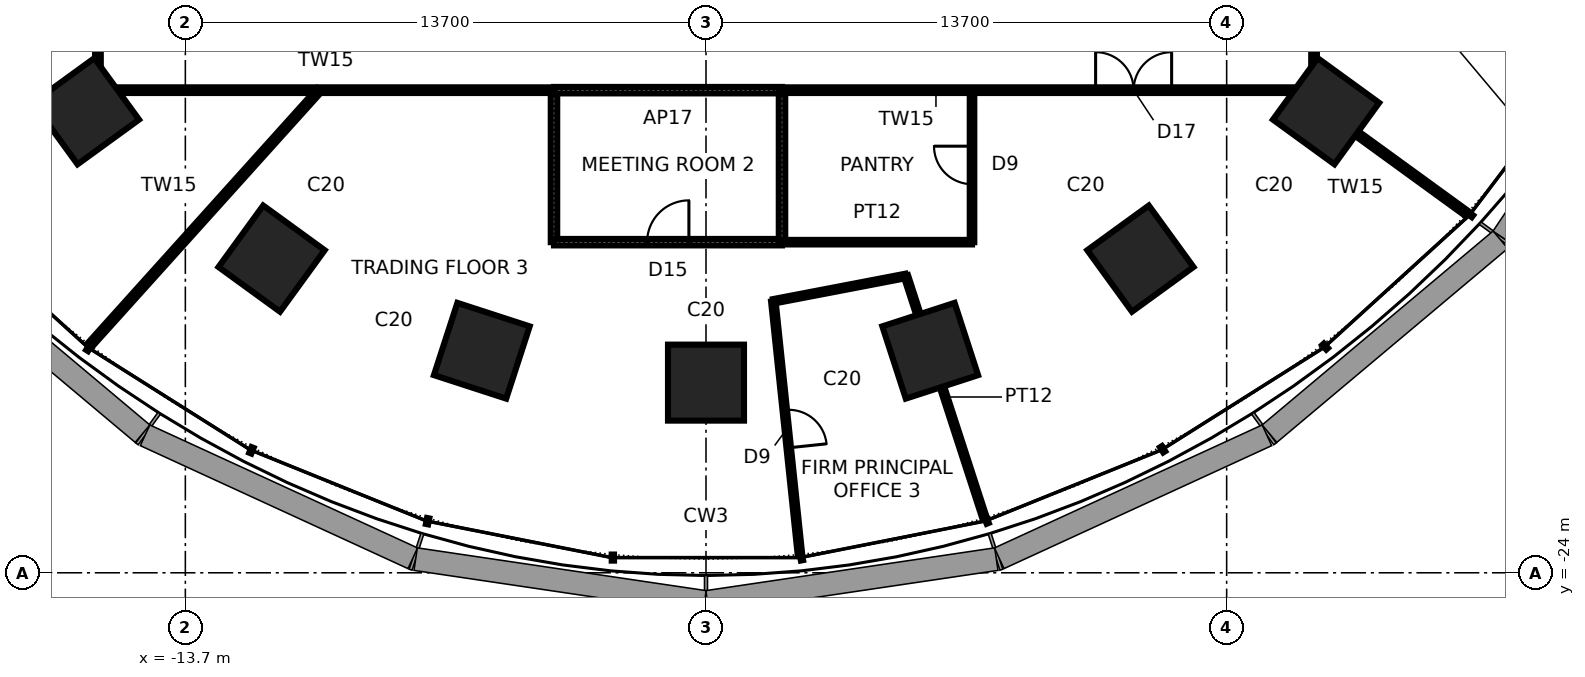
"""IFC4 building model, lengths in metres.
Left out: names, types, materials, properties, quantities, classifications, styles, units other than length and angle.
Written with IfcOpenShell. Run it as: python <this file> out.ifc"""

import sys

from ifc_helpers import new_model, si_unit, direction, frame, frame_2d, origin, origin_2d, place, context, subcontext, project, spatial, rectangle, extrude, element, fill, save


model = new_model("IFC4")
c1 = context("Model", 3, precision=1e-05, world=origin(), true_north=direction((0.0, 1.0)))
c2 = subcontext(c1, "Body", "Model", "MODEL_VIEW")
j1 = project(units=[si_unit("LENGTHUNIT", "METRE"), si_unit("PLANEANGLEUNIT", "RADIAN")], contexts=[c1])
p1 = place(None, origin())
s1 = spatial("IfcSite", under=j1, at=p1, CompositionType="ELEMENT")
p2 = place(p1, origin())
s2 = spatial("IfcBuilding", under=s1, at=p2, CompositionType="ELEMENT")
p3 = place(p2, frame((0.0, 0.0, 65.8)))
s3 = spatial("IfcBuildingStorey", under=s2, at=p3, CompositionType="ELEMENT", Elevation=65.8)
for number, where, z_axis, x_axis in (
    (1, (-16.315, -11.854, 0.0), (0.0, 0.0, 1.0), (-0.809, -0.588, 0.0)),
    (2, (-11.43, -15.733, 0.0), (0.0, 0.0, 1.0), (-0.588, -0.809, 0.0)),
    (3, (-5.9, -18.157, 0.0), (0.0, 0.0, 1.0), (-0.309, -0.951, 0.0)),
    (4, (0.0, -18.996, 0.0), (0.0, 0.0, 1.0), (0.0, -1.0, 0.0)),
    (5, (5.9, -18.157, 0.0), (0.0, 0.0, 1.0), (0.309, -0.951, 0.0)),
    (6, (11.43, -15.733, 0.0), (0.0, 0.0, 1.0), (0.588, -0.809, 0.0)),
    (7, (16.315, -11.854, 0.0), (0.0, 0.0, 1.0), (0.809, -0.588, 0.0)),
):
    element("IfcColumn", number, at=place(p3, frame(where, z_axis=z_axis, x_axis=x_axis)), inside=s3, PredefinedType="COLUMN", context=c2, shape_type="SweptSolid", body=[
        extrude(rectangle(XDim=2.0, YDim=2.0, at=origin_2d()), origin(), (0.0, 0.0, 1.0), 4.2),
    ])
p4 = place(p3, frame((-23.208, -10.333, 0.0), z_axis=(0.0, 0.0, 1.0), x_axis=(0.91354990356, 0.406726657235, 0.0)))
e8 = element("IfcWall", 8, at=p4, inside=s3, PredefinedType="PARTITIONING", context=c2, shape_type="SweptSolid", body=[
    extrude(rectangle(XDim=6.7, YDim=0.12, at=frame_2d((3.35, 0.0))), origin(), (0.0, 0.0, 1.0), 4.04),
])
p5 = place(p3, frame((-16.0, -3.5, 0.0), z_axis=(0.0, 0.0, 1.0), x_axis=(0.0, -1.0, 0.0)))
e9 = element("IfcWall", 9, at=p5, inside=s3, PredefinedType="PARTITIONING", context=c2, shape_type="SweptSolid", body=[
    extrude(rectangle(XDim=7.8, YDim=0.15, at=frame_2d((3.9, 0.0))), origin(), (0.0, 0.0, 1.0), 4.04),
])
p6 = place(p3, frame((-10.175, -11.3, 0.0), z_axis=(0.0, 0.0, 1.0), x_axis=(-0.669136564673, -0.743139460544, 0.0)))
e10 = element("IfcWall", 10, at=p6, inside=s3, PredefinedType="PARTITIONING", context=c2, shape_type="SweptSolid", body=[
    extrude(rectangle(XDim=9.026, YDim=0.15, at=frame_2d((4.513, 0.0))), origin(), (0.0, 0.0, 1.0), 4.04),
])
p7 = place(p3, frame((-16.0, -11.3, 0.0), z_axis=(0.0, 0.0, 1.0), x_axis=(1.0, 0.0, 0.0)))
e11 = element("IfcWall", 11, at=p7, inside=s3, PredefinedType="PARTITIONING", context=c2, shape_type="SweptSolid", body=[
    extrude(rectangle(XDim=12.0, YDim=0.15, at=frame_2d((6.0, 0.0))), origin(), (0.0, 0.0, 1.0), 4.04),
])
p8 = place(p3, frame((-4.0, -11.3, 0.0), z_axis=(0.0, 0.0, 1.0), x_axis=(0.0, -1.0, 0.0)))
e12 = element("IfcWall", 12, at=p8, inside=s3, PredefinedType="PARTITIONING", context=c2, shape_type="SweptSolid", body=[
    extrude(rectangle(XDim=4.0, YDim=0.17, at=frame_2d((2.0, 0.0))), origin(), (0.0, 0.0, 1.0), 4.04),
])
p9 = place(p3, frame((2.0, -11.3, 0.0), z_axis=(0.0, 0.0, 1.0), x_axis=(-1.0, 0.0, 0.0)))
e13 = element("IfcWall", 13, at=p9, inside=s3, PredefinedType="PARTITIONING", context=c2, shape_type="SweptSolid", body=[
    extrude(rectangle(XDim=6.0, YDim=0.17, at=frame_2d((3.0, 0.0))), origin(), (0.0, 0.0, 1.0), 4.04),
])
p10 = place(p3, frame((-4.0, -15.3, 0.0), z_axis=(0.0, 0.0, 1.0), x_axis=(1.0, 0.0, 0.0)))
e14 = element("IfcWall", 14, at=p10, inside=s3, PredefinedType="PARTITIONING", context=c2, shape_type="SweptSolid", body=[
    extrude(rectangle(XDim=6.0, YDim=0.17, at=frame_2d((3.0, 0.0))), origin(), (0.0, 0.0, 1.0), 3.586),
])
p11 = place(p10, frame((2.45, 0.0, 0.0)))
e15 = element("IfcOpeningElement", 15, at=p11, cuts=e14, PredefinedType="OPENING", context=c2, shape_type="SweptSolid", body=[
    extrude(rectangle(XDim=1.1, YDim=2.4, at=frame_2d((0.55, 1.2))), frame((0.0, 0.095, 0.0), z_axis=(0.0, -1.0, 0.0), x_axis=(1.0, 0.0, 0.0)), (0.0, 0.0, 1.0), 0.19),
])
p12 = place(p3, frame((1.772, -16.857, 0.0), z_axis=(0.0, 0.0, 1.0), x_axis=(0.104542522915, -0.994520417539, 0.0)))
e16 = element("IfcWall", 16, at=p12, inside=s3, PredefinedType="PARTITIONING", context=c2, shape_type="SweptSolid", body=[
    extrude(rectangle(XDim=6.7, YDim=0.12, at=frame_2d((3.35, 0.0))), origin(), (0.0, 0.0, 1.0), 4.04),
])
p13 = place(p12, frame((2.875, 0.0, 0.0)))
e17 = element("IfcOpeningElement", 17, at=p13, cuts=e16, PredefinedType="OPENING", context=c2, shape_type="SweptSolid", body=[
    extrude(rectangle(XDim=1.0, YDim=2.4, at=frame_2d((0.5, 1.2))), frame((0.0, 0.07, 0.0), z_axis=(0.0, -1.0, 0.0), x_axis=(1.0, 0.0, 0.0)), (0.0, 0.0, 1.0), 0.14),
])
p14 = place(p3, frame((2.0, -11.3, 0.0), z_axis=(0.0, 0.0, 1.0), x_axis=(0.0, -1.0, 0.0)))
e18 = element("IfcWall", 18, at=p14, inside=s3, PredefinedType="PARTITIONING", context=c2, shape_type="SweptSolid", body=[
    extrude(rectangle(XDim=4.0, YDim=0.17, at=frame_2d((2.0, 0.0))), origin(), (0.0, 0.0, 1.0), 4.04),
])
p15 = place(p3, frame((5.26, -16.188, 0.0), z_axis=(0.0, 0.0, 1.0), x_axis=(-0.982089213151, -0.188416499842, 0.0)))
e19 = element("IfcWall", 19, at=p15, inside=s3, PredefinedType="PARTITIONING", context=c2, shape_type="SweptSolid", body=[
    extrude(rectangle(XDim=3.552, YDim=0.12, at=frame_2d((1.776, 0.0))), origin(), (0.0, 0.0, 1.0), 4.04),
])
p16 = place(p3, frame((2.0, -15.3, 0.0), z_axis=(0.0, 0.0, 1.0), x_axis=(1.0, 0.0, 0.0)))
e20 = element("IfcWall", 20, at=p16, inside=s3, PredefinedType="PARTITIONING", context=c2, shape_type="SweptSolid", body=[
    extrude(rectangle(XDim=5.0, YDim=0.12, at=frame_2d((2.5, 0.0))), origin(), (0.0, 0.0, 1.0), 3.586),
])
p17 = place(p3, frame((7.33, -22.56, 0.0), z_axis=(0.0, 0.0, 1.0), x_axis=(-0.309003676349, 0.951060843481, 0.0)))
e21 = element("IfcWall", 21, at=p17, inside=s3, PredefinedType="PARTITIONING", context=c2, shape_type="SweptSolid", body=[
    extrude(rectangle(XDim=6.7, YDim=0.12, at=frame_2d((3.35, 0.0))), origin(), (0.0, 0.0, 1.0), 2.84),
])
p18 = place(p3, frame((7.0, -15.3, 0.0), z_axis=(0.0, 0.0, 1.0), x_axis=(0.0, 1.0, 0.0)))
e22 = element("IfcWall", 22, at=p18, inside=s3, PredefinedType="PARTITIONING", context=c2, shape_type="SweptSolid", body=[
    extrude(rectangle(XDim=4.0, YDim=0.12, at=frame_2d((2.0, 0.0))), origin(), (0.0, 0.0, 1.0), 4.04),
])
p19 = place(p18, frame((1.526, 0.0, 0.0)))
e23 = element("IfcOpeningElement", 23, at=p19, cuts=e22, PredefinedType="OPENING", context=c2, shape_type="SweptSolid", body=[
    extrude(rectangle(XDim=1.0, YDim=2.4, at=frame_2d((0.5, 1.2))), frame((0.0, 0.07, 0.0), z_axis=(0.0, -1.0, 0.0), x_axis=(1.0, 0.0, 0.0)), (0.0, 0.0, 1.0), 0.14),
])
p20 = place(p3, frame((2.0, -11.3, 0.0), z_axis=(0.0, 0.0, 1.0), x_axis=(1.0, 0.0, 0.0)))
e24 = element("IfcWall", 24, at=p20, inside=s3, PredefinedType="PARTITIONING", context=c2, shape_type="SweptSolid", body=[
    extrude(rectangle(XDim=14.0, YDim=0.15, at=frame_2d((7.0, 0.0))), origin(), (0.0, 0.0, 1.0), 4.04),
])
p21 = place(p20, frame((8.252, 0.0, 0.0)))
e25 = element("IfcOpeningElement", 25, at=p21, cuts=e24, PredefinedType="OPENING", context=c2, shape_type="SweptSolid", body=[
    extrude(rectangle(XDim=2.0, YDim=2.4, at=frame_2d((1.0, 1.2))), frame((0.0, 0.085, 0.0), z_axis=(0.0, -1.0, 0.0), x_axis=(1.0, 0.0, 0.0)), (0.0, 0.0, 1.0), 0.17),
])
p22 = place(p3, frame((15.553, -11.3, 0.0), z_axis=(0.0, 0.0, 1.0), x_axis=(0.809032304237, -0.587764179499, 0.0)))
e26 = element("IfcWall", 26, at=p22, inside=s3, PredefinedType="PARTITIONING", context=c2, shape_type="SweptSolid", body=[
    extrude(rectangle(XDim=5.522, YDim=0.15, at=frame_2d((2.761, 0.0))), origin(), (0.0, 0.0, 1.0), 2.84),
])
p23 = place(p3, frame((16.0, -11.3, 0.0), z_axis=(0.0, 0.0, 1.0), x_axis=(0.0, 1.0, 0.0)))
e27 = element("IfcWall", 27, at=p23, inside=s3, PredefinedType="PARTITIONING", context=c2, shape_type="SweptSolid", body=[
    extrude(rectangle(XDim=7.8, YDim=0.15, at=frame_2d((3.9, 0.0))), origin(), (0.0, 0.0, 1.0), 4.04),
])
p24 = place(p13, origin())
e28 = element("IfcDoor", 28, at=p24, inside=s3, OperationType="SINGLE_SWING_RIGHT", PredefinedType="DOOR", context=c2, shape_type="SweptSolid", body=[
    extrude(rectangle(XDim=1.0, YDim=2.4, at=frame_2d((0.5, 1.2))), frame((0.0, 0.025, 0.0), z_axis=(0.0, -1.0, 0.0), x_axis=(1.0, 0.0, 0.0)), (0.0, 0.0, 1.0), 0.05),
])
fill(e17, e28)
p25 = place(p11, origin())
e29 = element("IfcDoor", 29, at=p25, inside=s3, OperationType="SINGLE_SWING_RIGHT", PredefinedType="DOOR", context=c2, shape_type="SweptSolid", body=[
    extrude(rectangle(XDim=1.1, YDim=2.4, at=frame_2d((0.55, 1.2))), frame((0.0, 0.025, 0.0), z_axis=(0.0, -1.0, 0.0), x_axis=(1.0, 0.0, 0.0)), (0.0, 0.0, 1.0), 0.05),
])
fill(e15, e29)
p26 = place(p19, origin())
e30 = element("IfcDoor", 30, at=p26, inside=s3, OperationType="SINGLE_SWING_RIGHT", PredefinedType="DOOR", context=c2, shape_type="SweptSolid", body=[
    extrude(rectangle(XDim=1.0, YDim=2.4, at=frame_2d((0.5, 1.2))), frame((0.0, 0.025, 0.0), z_axis=(0.0, -1.0, 0.0), x_axis=(1.0, 0.0, 0.0)), (0.0, 0.0, 1.0), 0.05),
])
fill(e23, e30)
p27 = place(p21, origin())
e31 = element("IfcDoor", 31, at=p27, inside=s3, OperationType="DOUBLE_DOOR_SINGLE_SWING", PredefinedType="DOOR", context=c2, shape_type="SweptSolid", body=[
    extrude(rectangle(XDim=2.0, YDim=2.4, at=frame_2d((1.0, 1.2))), frame((0.0, 0.025, 0.0), z_axis=(0.0, -1.0, 0.0), x_axis=(1.0, 0.0, 0.0)), (0.0, 0.0, 1.0), 0.05),
])
fill(e25, e31)
save(model, sys.argv[1])
